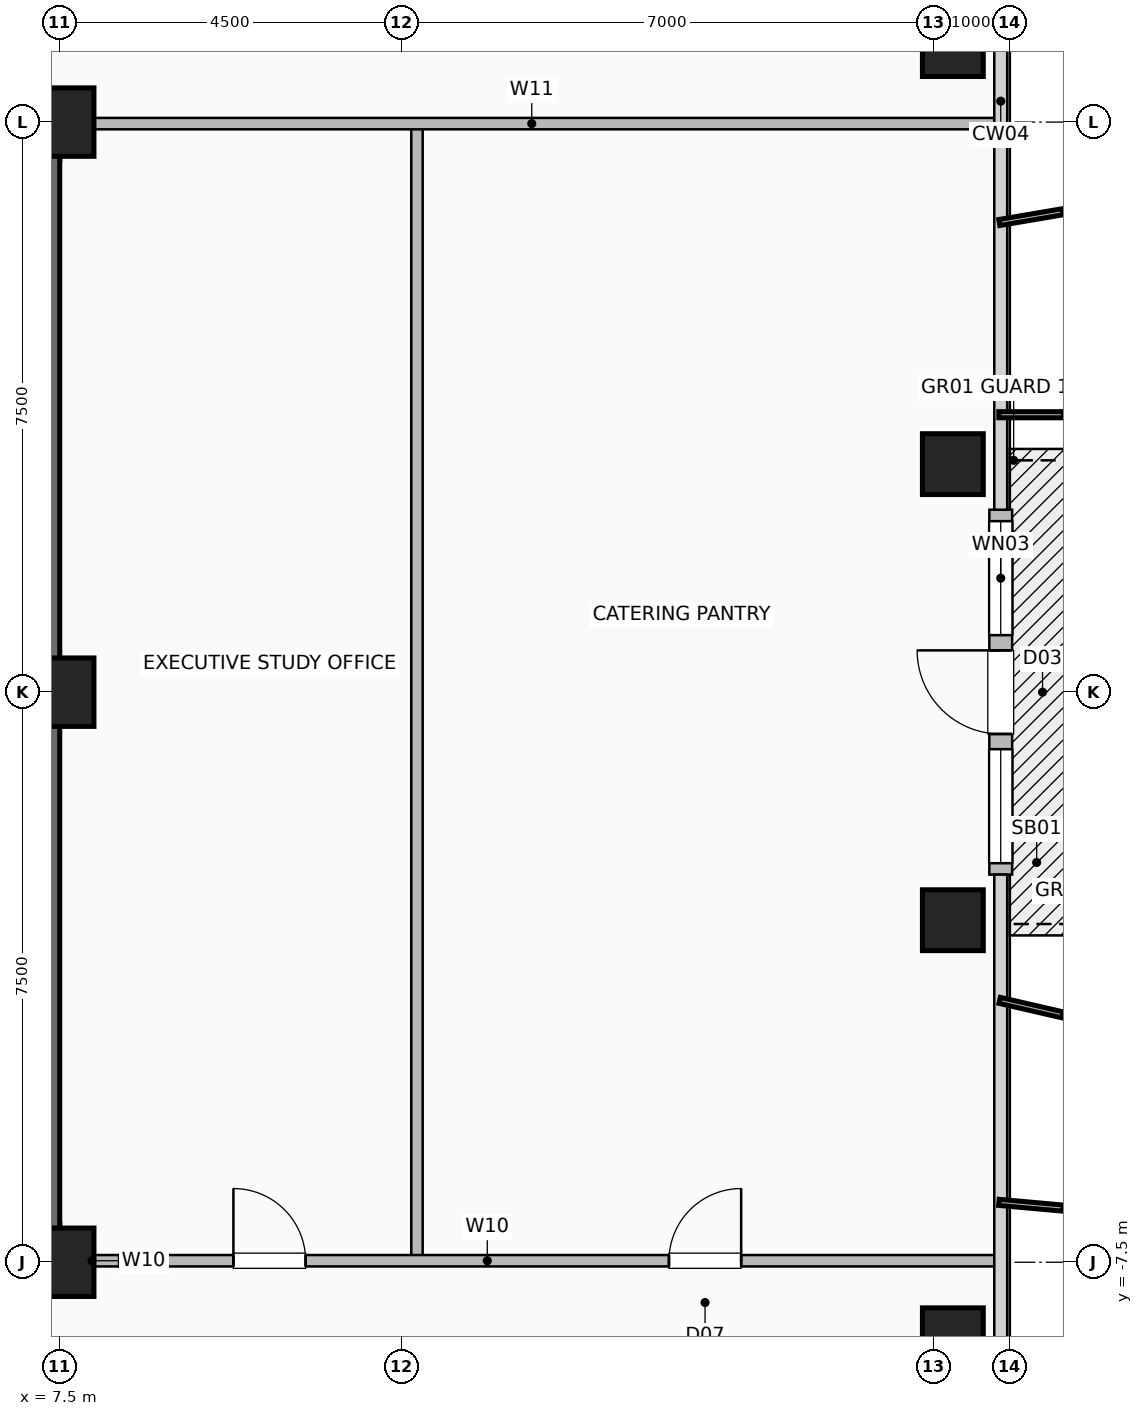
"""IFC4 building model, lengths in metres.
Left out: names, types, materials, properties, quantities, classifications, styles, units other than length and angle.
Written with IfcOpenShell. Run it as: python <this file> out.ifc"""

import sys

from ifc_helpers import new_model, si_unit, direction, frame, frame_2d, origin, origin_2d, place, context, subcontext, project, spatial, rectangle, hollow_rectangle, extrude, element, fill, save


model = new_model("IFC4")
c1 = context("Model", 3, precision=1e-05, world=origin(), true_north=direction((0.0, 1.0)))
c2 = subcontext(c1, "Body", "Model", "MODEL_VIEW")
j1 = project(units=[si_unit("LENGTHUNIT", "METRE"), si_unit("PLANEANGLEUNIT", "RADIAN")], contexts=[c1])
p1 = place(None, origin())
s1 = spatial("IfcSite", under=j1, at=p1, CompositionType="ELEMENT")
p2 = place(p1, origin())
s2 = spatial("IfcBuilding", under=s1, at=p2, CompositionType="ELEMENT")
p3 = place(p2, frame((0.0, 0.0, 216.6)))
s3 = spatial("IfcBuildingStorey", under=s2, at=p3, CompositionType="ELEMENT", Elevation=216.6)
for number, where, z_axis, x_axis in (
    (1, (7.5, -7.5, 0.0), (0.0, 0.0, 1.0), (1.0, 0.0, 0.0)),
    (2, (7.5, 0.0, 0.0), (0.0, 0.0, 1.0), (1.0, 0.0, 0.0)),
    (3, (7.5, 7.5, 0.0), (0.0, 0.0, 1.0), (1.0, 0.0, 0.0)),
):
    element("IfcColumn", number, at=place(p3, frame(where, z_axis=z_axis, x_axis=x_axis)), inside=s3, PredefinedType="COLUMN", context=c2, shape_type="SweptSolid", body=[
        extrude(hollow_rectangle(XDim=0.9, YDim=0.9, WallThickness=0.045, at=origin_2d()), origin(), (0.0, 0.0, 1.0), 3.6),
    ])
for number, where, z_axis, x_axis in (
    (4, (19.25, -8.5, 0.0), (0.0, 0.0, 1.0), (1.0, 0.0, 0.0)),
    (5, (19.25, -3.0, 0.0), (0.0, 0.0, 1.0), (1.0, 0.0, 0.0)),
    (6, (19.25, 3.0, 0.0), (0.0, 0.0, 1.0), (1.0, 0.0, 0.0)),
    (7, (19.25, 8.5, 0.0), (0.0, 0.0, 1.0), (1.0, 0.0, 0.0)),
):
    element("IfcColumn", number, at=place(p3, frame(where, z_axis=z_axis, x_axis=x_axis)), inside=s3, PredefinedType="COLUMN", context=c2, shape_type="SweptSolid", body=[
        extrude(hollow_rectangle(XDim=0.8, YDim=0.8, WallThickness=0.04, at=origin_2d()), origin(), (0.0, 0.0, 1.0), 3.6),
    ])
p4 = place(p3, frame((19.88, -2.4, 0.0), z_axis=(0.0, 0.0, 1.0), x_axis=(0.0, 1.0, 0.0)))
e8 = element("IfcWall", 8, at=p4, inside=s3, PredefinedType="SOLIDWALL", context=c2, shape_type="SweptSolid", body=[
    extrude(rectangle(XDim=4.8, YDim=0.3, at=frame_2d((2.4, 0.0))), origin(), (0.0, 0.0, 1.0), 3.36),
])
p5 = place(p4, frame((1.85, 0.0, 0.0)))
e9 = element("IfcOpeningElement", 9, at=p5, cuts=e8, PredefinedType="OPENING", context=c2, shape_type="SweptSolid", body=[
    extrude(rectangle(XDim=1.1, YDim=2.2, at=frame_2d((0.55, 1.1))), frame((0.0, 0.16, 0.0), z_axis=(0.0, -1.0, 0.0), x_axis=(1.0, 0.0, 0.0)), (0.0, 0.0, 1.0), 0.32),
])
p6 = place(p4, frame((0.15, 0.0, 0.85)))
e10 = element("IfcOpeningElement", 10, at=p6, cuts=e8, PredefinedType="OPENING", context=c2, shape_type="SweptSolid", body=[
    extrude(rectangle(XDim=1.5, YDim=1.8, at=frame_2d((0.75, 0.9))), frame((0.0, 0.16, 0.0), z_axis=(0.0, -1.0, 0.0), x_axis=(1.0, 0.0, 0.0)), (0.0, 0.0, 1.0), 0.32),
])
p7 = place(p4, frame((3.15, 0.0, 0.85)))
e11 = element("IfcOpeningElement", 11, at=p7, cuts=e8, PredefinedType="OPENING", context=c2, shape_type="SweptSolid", body=[
    extrude(rectangle(XDim=1.5, YDim=1.8, at=frame_2d((0.75, 0.9))), frame((0.0, 0.16, 0.0), z_axis=(0.0, -1.0, 0.0), x_axis=(1.0, 0.0, 0.0)), (0.0, 0.0, 1.0), 0.32),
])
p8 = place(p3, frame((-7.5, -7.25, 0.0), z_axis=(0.0, 0.0, 1.0), x_axis=(1.0, 0.0, 0.0)))
e12 = element("IfcWall", 12, at=p8, inside=s3, PredefinedType="SHEAR", context=c2, shape_type="SweptSolid", body=[
    extrude(rectangle(XDim=15.0, YDim=0.5, at=frame_2d((7.5, 0.0))), origin(), (0.0, 0.0, 1.0), 3.36),
])
p9 = place(p8, frame((1.55, 0.0, 0.0)))
e13 = element("IfcOpeningElement", 13, at=p9, cuts=e12, PredefinedType="OPENING", context=c2, shape_type="SweptSolid", body=[
    extrude(rectangle(XDim=1.05, YDim=2.08, at=frame_2d((0.525, 1.04))), frame((0.0, 0.26, 0.0), z_axis=(0.0, -1.0, 0.0), x_axis=(1.0, 0.0, 0.0)), (0.0, 0.0, 1.0), 0.52),
])
p10 = place(p8, frame((12.4, 0.0, 0.0)))
e14 = element("IfcOpeningElement", 14, at=p10, cuts=e12, PredefinedType="OPENING", context=c2, shape_type="SweptSolid", body=[
    extrude(rectangle(XDim=1.05, YDim=2.08, at=frame_2d((0.525, 1.04))), frame((0.0, 0.26, 0.0), z_axis=(0.0, -1.0, 0.0), x_axis=(1.0, 0.0, 0.0)), (0.0, 0.0, 1.0), 0.52),
])
p11 = place(p8, frame((5.2, 0.0, 0.0)))
e15 = element("IfcOpeningElement", 15, at=p11, cuts=e12, PredefinedType="OPENING", context=c2, shape_type="SweptSolid", body=[
    extrude(rectangle(XDim=1.0, YDim=2.08, at=frame_2d((0.5, 1.04))), frame((0.0, 0.26, 0.0), z_axis=(0.0, -1.0, 0.0), x_axis=(1.0, 0.0, 0.0)), (0.0, 0.0, 1.0), 0.52),
])
p12 = place(p8, frame((8.65, 0.0, 0.0)))
e16 = element("IfcOpeningElement", 16, at=p12, cuts=e12, PredefinedType="OPENING", context=c2, shape_type="SweptSolid", body=[
    extrude(rectangle(XDim=1.0, YDim=2.08, at=frame_2d((0.5, 1.04))), frame((0.0, 0.26, 0.0), z_axis=(0.0, -1.0, 0.0), x_axis=(1.0, 0.0, 0.0)), (0.0, 0.0, 1.0), 0.52),
])
for number, where, z_axis, x_axis in (
    (17, (-7.5, 7.25, 0.0), (0.0, 0.0, 1.0), (1.0, 0.0, 0.0)),
    (18, (7.25, -7.5, 0.0), (0.0, 0.0, 1.0), (0.0, 1.0, 0.0)),
):
    element("IfcWall", number, at=place(p3, frame(where, z_axis=z_axis, x_axis=x_axis)), inside=s3, PredefinedType="SHEAR", context=c2, shape_type="SweptSolid", body=[
        extrude(rectangle(XDim=15.0, YDim=0.5, at=frame_2d((7.5, 0.0))), origin(), (0.0, 0.0, 1.0), 3.36),
    ])
p13 = place(p3, frame((7.45, -7.48, 0.0), z_axis=(0.0, 0.0, 1.0), x_axis=(1.0, 0.0, 0.0)))
e19 = element("IfcWall", 19, at=p13, inside=s3, PredefinedType="PARTITIONING", context=c2, shape_type="SweptSolid", body=[
    extrude(rectangle(XDim=0.95, YDim=0.15, at=frame_2d((0.475, 0.0))), origin(), (0.0, 0.0, 1.0), 3.36),
])
p14 = place(p3, frame((12.2, -7.48, 0.0), z_axis=(0.0, 0.0, 1.0), x_axis=(0.0, 1.0, 0.0)))
e20 = element("IfcWall", 20, at=p14, inside=s3, PredefinedType="PARTITIONING", context=c2, shape_type="SweptSolid", body=[
    extrude(rectangle(XDim=14.9, YDim=0.15, at=frame_2d((7.45, 0.0))), origin(), (0.0, 0.0, 1.0), 3.36),
])
p15 = place(p3, frame((8.28, -7.48, 0.0), z_axis=(0.0, 0.0, 1.0), x_axis=(1.0, 0.0, 0.0)))
e21 = element("IfcWall", 21, at=p15, inside=s3, PredefinedType="PARTITIONING", context=c2, shape_type="SweptSolid", body=[
    extrude(rectangle(XDim=11.54, YDim=0.15, at=frame_2d((5.77, 0.0))), origin(), (0.0, 0.0, 1.0), 3.36),
])
p16 = place(p15, frame((1.505, 0.0, 0.0)))
e22 = element("IfcOpeningElement", 22, at=p16, cuts=e21, PredefinedType="OPENING", context=c2, shape_type="SweptSolid", body=[
    extrude(rectangle(XDim=0.95, YDim=2.06, at=frame_2d((0.475, 1.03))), frame((0.0, 0.085, 0.0), z_axis=(0.0, -1.0, 0.0), x_axis=(1.0, 0.0, 0.0)), (0.0, 0.0, 1.0), 0.17),
])
p17 = place(p15, frame((7.235, 0.0, 0.0)))
e23 = element("IfcOpeningElement", 23, at=p17, cuts=e21, PredefinedType="OPENING", context=c2, shape_type="SweptSolid", body=[
    extrude(rectangle(XDim=0.95, YDim=2.06, at=frame_2d((0.475, 1.03))), frame((0.0, 0.085, 0.0), z_axis=(0.0, -1.0, 0.0), x_axis=(1.0, 0.0, 0.0)), (0.0, 0.0, 1.0), 0.17),
])
p18 = place(p3, frame((7.6, 7.48, 0.0), z_axis=(0.0, 0.0, 1.0), x_axis=(1.0, 0.0, 0.0)))
e24 = element("IfcWall", 24, at=p18, inside=s3, PredefinedType="PARTITIONING", context=c2, shape_type="SweptSolid", body=[
    extrude(rectangle(XDim=12.22, YDim=0.15, at=frame_2d((6.11, 0.0))), origin(), (0.0, 0.0, 1.0), 3.36),
])
p19 = place(p5, origin())
e25 = element("IfcDoor", 25, at=p19, inside=s3, OperationType="SINGLE_SWING_RIGHT", PredefinedType="DOOR", context=c2, shape_type="SweptSolid", body=[
    extrude(rectangle(XDim=1.1, YDim=2.2, at=frame_2d((0.55, 1.1))), frame((0.0, 0.025, 0.0), z_axis=(0.0, -1.0, 0.0), x_axis=(1.0, 0.0, 0.0)), (0.0, 0.0, 1.0), 0.05),
])
fill(e9, e25)
p20 = place(p6, origin())
e26 = element("IfcWindow", 26, at=p20, inside=s3, PartitioningType="SINGLE_PANEL", PredefinedType="WINDOW", context=c2, shape_type="SweptSolid", body=[
    extrude(rectangle(XDim=1.5, YDim=1.8, at=frame_2d((0.75, 0.9))), frame((0.0, 0.03, 0.0), z_axis=(0.0, -1.0, 0.0), x_axis=(1.0, 0.0, 0.0)), (0.0, 0.0, 1.0), 0.06),
])
fill(e10, e26)
p21 = place(p7, origin())
e27 = element("IfcWindow", 27, at=p21, inside=s3, PartitioningType="SINGLE_PANEL", PredefinedType="WINDOW", context=c2, shape_type="SweptSolid", body=[
    extrude(rectangle(XDim=1.5, YDim=1.8, at=frame_2d((0.75, 0.9))), frame((0.0, 0.03, 0.0), z_axis=(0.0, -1.0, 0.0), x_axis=(1.0, 0.0, 0.0)), (0.0, 0.0, 1.0), 0.06),
])
fill(e11, e27)
p22 = place(p16, origin())
e28 = element("IfcDoor", 28, at=p22, inside=s3, OperationType="SINGLE_SWING_LEFT", PredefinedType="DOOR", context=c2, shape_type="SweptSolid", body=[
    extrude(rectangle(XDim=0.95, YDim=2.06, at=frame_2d((0.475, 1.03))), frame((0.0, 0.025, 0.0), z_axis=(0.0, -1.0, 0.0), x_axis=(1.0, 0.0, 0.0)), (0.0, 0.0, 1.0), 0.05),
])
fill(e22, e28)
p23 = place(p17, origin())
e29 = element("IfcDoor", 29, at=p23, inside=s3, OperationType="SINGLE_SWING_RIGHT", PredefinedType="DOOR", context=c2, shape_type="SweptSolid", body=[
    extrude(rectangle(XDim=0.95, YDim=2.06, at=frame_2d((0.475, 1.03))), frame((0.0, 0.025, 0.0), z_axis=(0.0, -1.0, 0.0), x_axis=(1.0, 0.0, 0.0)), (0.0, 0.0, 1.0), 0.05),
])
fill(e23, e29)
save(model, sys.argv[1])
